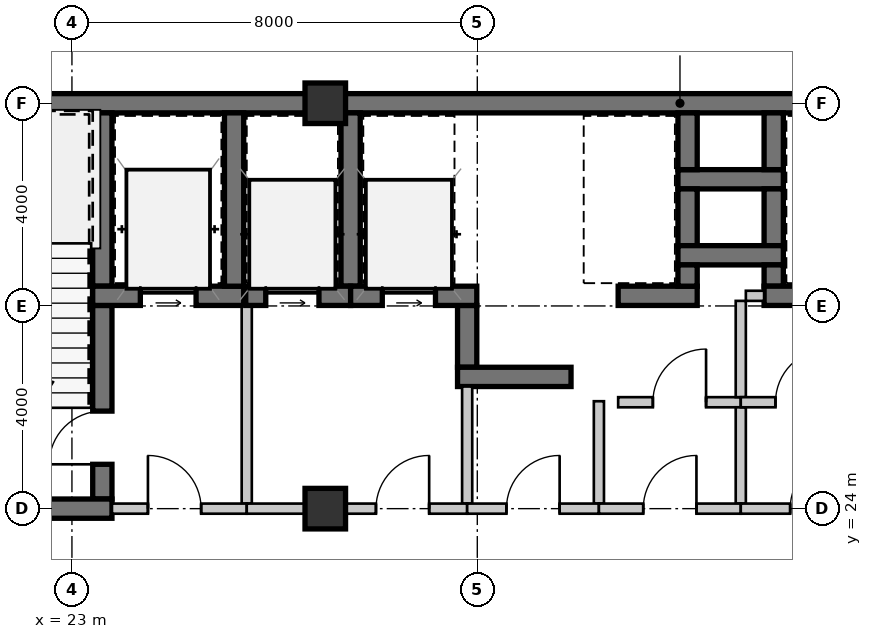
"""IFC4 building model, lengths in metres.
Left out: names, types, materials, properties, quantities, classifications, styles, units other than length and angle.
Written with IfcOpenShell. Run it as: python <this file> out.ifc"""

import sys

from ifc_helpers import new_model, si_unit, direction, frame, frame_2d, origin, origin_2d, place, context, subcontext, project, spatial, rectangle, extrude, source, transform, mapped, element, fill, save


model = new_model("IFC4")
c1 = context("Model", 3, precision=1e-05, world=origin(), true_north=direction((0.0, 1.0)))
c2 = subcontext(c1, "Body", "Model", "MODEL_VIEW")
j1 = project(units=[si_unit("LENGTHUNIT", "METRE"), si_unit("PLANEANGLEUNIT", "RADIAN")], contexts=[c1])
p1 = place(None, origin())
s1 = spatial("IfcSite", under=j1, at=p1, CompositionType="ELEMENT")
p2 = place(p1, origin())
s2 = spatial("IfcBuilding", under=s1, at=p2, CompositionType="ELEMENT")
p3 = place(p2, frame((0.0, 0.0, 26.25)))
s3 = spatial("IfcBuildingStorey", under=s2, at=p3, CompositionType="ELEMENT", Elevation=26.25)
m1 = source(origin(), c2, "Body", "SweptSolid", [
    extrude(rectangle(XDim=0.8, YDim=0.8, at=origin_2d()), origin(), (0.0, 0.0, 1.0), 3.15),
])
for number, where, z_axis, x_axis in (
    (1, (28.0, 24.0, 0.0), (0.0, 0.0, 1.0), (1.0, 0.0, 0.0)),
    (2, (28.0, 32.0, 0.0), (0.0, 0.0, 1.0), (1.0, 0.0, 0.0)),
):
    element("IfcColumn", number, at=place(p3, frame(where, z_axis=z_axis, x_axis=x_axis)), inside=s3, PredefinedType="COLUMN", context=c2, shape_type="MappedRepresentation", body=[
        mapped(m1, transform((0.0, 0.0, 0.0), scale=1.0)),
    ])
m2 = source(origin(), c2, "Body", "SweptSolid", [
    extrude(rectangle(XDim=9.19, YDim=0.38, at=frame_2d((4.595, 0.0))), origin(), (0.0, 0.0, 1.0), 2.93),
])
p4 = place(p3, frame((18.81, 32.0, 0.0), z_axis=(0.0, 0.0, 1.0), x_axis=(1.0, 0.0, 0.0)))
e3 = element("IfcWall", 3, at=p4, inside=s3, PredefinedType="SHEAR", context=c2, shape_type="MappedRepresentation", body=[
    mapped(m2, transform((0.0, 0.0, 0.0), scale=1.0)),
])
m3 = source(origin(), c2, "Body", "SweptSolid", [
    extrude(rectangle(XDim=11.2, YDim=0.38, at=frame_2d((5.6, 0.0))), origin(), (0.0, 0.0, 1.0), 2.93),
])
p5 = place(p3, frame((28.0, 32.0, 0.0), z_axis=(0.0, 0.0, 1.0), x_axis=(1.0, 0.0, 0.0)))
e4 = element("IfcWall", 4, at=p5, inside=s3, PredefinedType="SHEAR", context=c2, shape_type="MappedRepresentation", body=[
    mapped(m3, transform((0.0, 0.0, 0.0), scale=1.0)),
])
m4 = source(origin(), c2, "Body", "SweptSolid", [
    extrude(rectangle(XDim=3.42, YDim=0.38, at=frame_2d((1.71, 0.0))), origin(), (0.0, 0.0, 1.0), 2.93),
])
p6 = place(p3, frame((23.6, 28.39, 0.0), z_axis=(0.0, 0.0, 1.0), x_axis=(0.0, 1.0, 0.0)))
e5 = element("IfcWall", 5, at=p6, inside=s3, PredefinedType="SHEAR", context=c2, shape_type="MappedRepresentation", body=[
    mapped(m4, transform((0.0, 0.0, 0.0), scale=1.0)),
])
m5 = source(origin(), c2, "Body", "SweptSolid", [
    extrude(rectangle(XDim=3.82, YDim=0.38, at=frame_2d((1.91, 0.0))), origin(), (0.0, 0.0, 1.0), 2.93),
])
p7 = place(p3, frame((23.6, 24.19, 0.0), z_axis=(0.0, 0.0, 1.0), x_axis=(0.0, 1.0, 0.0)))
e6 = element("IfcWall", 6, at=p7, inside=s3, PredefinedType="SHEAR", context=c2, shape_type="MappedRepresentation", body=[
    mapped(m5, transform((0.0, 0.0, 0.0), scale=1.0)),
])
m6 = source(origin(), c2, "Body", "SweptSolid", [
    extrude(rectangle(XDim=1.05, YDim=2.1, at=frame_2d((0.525, 1.05))), frame((0.0, 0.2, 0.0), z_axis=(0.0, -1.0, 0.0), x_axis=(1.0, 0.0, 0.0)), (0.0, 0.0, 1.0), 0.4),
])
p8 = place(p7, frame((0.685, 0.0, 0.0)))
e7 = element("IfcOpeningElement", 7, at=p8, cuts=e6, PredefinedType="OPENING", context=c2, shape_type="MappedRepresentation", body=[
    mapped(m6, transform((0.0, 0.0, 0.0), scale=1.0)),
])
m7 = source(origin(), c2, "Body", "SweptSolid", [
    extrude(rectangle(XDim=4.98, YDim=0.38, at=frame_2d((2.49, 0.0))), origin(), (0.0, 0.0, 1.0), 2.93),
])
p9 = place(p3, frame((18.81, 24.0, 0.0), z_axis=(0.0, 0.0, 1.0), x_axis=(1.0, 0.0, 0.0)))
e8 = element("IfcWall", 8, at=p9, inside=s3, PredefinedType="SHEAR", context=c2, shape_type="MappedRepresentation", body=[
    mapped(m7, transform((0.0, 0.0, 0.0), scale=1.0)),
])
m8 = source(origin(), c2, "Body", "SweptSolid", [
    extrude(rectangle(XDim=2.98, YDim=0.38, at=frame_2d((1.49, 0.0))), origin(), (0.0, 0.0, 1.0), 2.93),
])
p10 = place(p3, frame((23.41, 28.2, 0.0), z_axis=(0.0, 0.0, 1.0), x_axis=(1.0, 0.0, 0.0)))
e9 = element("IfcWall", 9, at=p10, inside=s3, PredefinedType="SHEAR", context=c2, shape_type="MappedRepresentation", body=[
    mapped(m8, transform((0.0, 0.0, 0.0), scale=1.0)),
])
m9 = source(origin(), c2, "Body", "SweptSolid", [
    extrude(rectangle(XDim=1.1, YDim=2.15, at=frame_2d((0.55, 1.075))), frame((0.0, 0.2, 0.0), z_axis=(0.0, -1.0, 0.0), x_axis=(1.0, 0.0, 0.0)), (0.0, 0.0, 1.0), 0.4),
])
p11 = place(p10, frame((0.94, 0.0, 0.0)))
e10 = element("IfcOpeningElement", 10, at=p11, cuts=e9, PredefinedType="OPENING", context=c2, shape_type="MappedRepresentation", body=[
    mapped(m9, transform((0.0, 0.0, 0.0), scale=1.0)),
])
p12 = place(p3, frame((26.2, 28.39, 0.0), z_axis=(0.0, 0.0, 1.0), x_axis=(0.0, 1.0, 0.0)))
e11 = element("IfcWall", 11, at=p12, inside=s3, PredefinedType="SHEAR", context=c2, shape_type="MappedRepresentation", body=[
    mapped(m4, transform((0.0, 0.0, 0.0), scale=1.0)),
])
m10 = source(origin(), c2, "Body", "SweptSolid", [
    extrude(rectangle(XDim=3.91, YDim=0.2, at=frame_2d((1.955, 0.0))), origin(), (0.0, 0.0, 1.0), 2.93),
])
p13 = place(p3, frame((26.45, 24.1, 0.0), z_axis=(0.0, 0.0, 1.0), x_axis=(0.0, 1.0, 0.0)))
e12 = element("IfcWall", 12, at=p13, inside=s3, PredefinedType="SOLIDWALL", context=c2, shape_type="MappedRepresentation", body=[
    mapped(m10, transform((0.0, 0.0, 0.0), scale=1.0)),
])
m11 = source(origin(), c2, "Body", "SweptSolid", [
    extrude(rectangle(XDim=2.66, YDim=0.2, at=frame_2d((1.33, 0.0))), origin(), (0.0, 0.0, 1.0), 2.47),
])
p14 = place(p3, frame((23.79, 24.0, 0.0), z_axis=(0.0, 0.0, 1.0), x_axis=(1.0, 0.0, 0.0)))
e13 = element("IfcWall", 13, at=p14, inside=s3, PredefinedType="SOLIDWALL", context=c2, shape_type="MappedRepresentation", body=[
    mapped(m11, transform((0.0, 0.0, 0.0), scale=1.0)),
])
m12 = source(origin(), c2, "Body", "SweptSolid", [
    extrude(rectangle(XDim=1.05, YDim=2.1, at=frame_2d((0.525, 1.05))), frame((0.0, 0.11, 0.0), z_axis=(0.0, -1.0, 0.0), x_axis=(1.0, 0.0, 0.0)), (0.0, 0.0, 1.0), 0.22),
])
p15 = place(p14, frame((0.71, 0.0, 0.0)))
e14 = element("IfcOpeningElement", 14, at=p15, cuts=e13, PredefinedType="OPENING", context=c2, shape_type="MappedRepresentation", body=[
    mapped(m12, transform((0.0, 0.0, 0.0), scale=1.0)),
])
m13 = source(origin(), c2, "Body", "SweptSolid", [
    extrude(rectangle(XDim=2.08, YDim=0.38, at=frame_2d((1.04, 0.0))), origin(), (0.0, 0.0, 1.0), 2.93),
])
p16 = place(p3, frame((34.96, 30.5, 0.0), z_axis=(0.0, 0.0, 1.0), x_axis=(1.0, 0.0, 0.0)))
e15 = element("IfcWall", 15, at=p16, inside=s3, PredefinedType="SHEAR", context=c2, shape_type="MappedRepresentation", body=[
    mapped(m13, transform((0.0, 0.0, 0.0), scale=1.0)),
])
m14 = source(origin(), c2, "Body", "SweptSolid", [
    extrude(rectangle(XDim=1.12, YDim=0.38, at=frame_2d((0.56, 0.0))), origin(), (0.0, 0.0, 1.0), 2.93),
])
for number, where, z_axis, x_axis in (
    (16, (35.15, 31.81, 0.0), (0.0, 0.0, 1.0), (0.0, -1.0, 0.0)),
    (17, (36.85, 30.69, 0.0), (0.0, 0.0, 1.0), (0.0, 1.0, 0.0)),
    (18, (35.15, 30.31, 0.0), (0.0, 0.0, 1.0), (0.0, -1.0, 0.0)),
    (19, (36.85, 29.19, 0.0), (0.0, 0.0, 1.0), (0.0, 1.0, 0.0)),
):
    element("IfcWall", number, at=place(p3, frame(where, z_axis=z_axis, x_axis=x_axis)), inside=s3, PredefinedType="SHEAR", context=c2, shape_type="MappedRepresentation", body=[
        mapped(m14, transform((0.0, 0.0, 0.0), scale=1.0)),
    ])
p17 = place(p3, frame((34.96, 29.0, 0.0), z_axis=(0.0, 0.0, 1.0), x_axis=(1.0, 0.0, 0.0)))
e20 = element("IfcWall", 20, at=p17, inside=s3, PredefinedType="SHEAR", context=c2, shape_type="MappedRepresentation", body=[
    mapped(m13, transform((0.0, 0.0, 0.0), scale=1.0)),
])
m15 = source(origin(), c2, "Body", "SweptSolid", [
    extrude(rectangle(XDim=1.22, YDim=0.38, at=frame_2d((0.61, 0.0))), origin(), (0.0, 0.0, 1.0), 2.93),
])
p18 = place(p3, frame((30.8, 28.01, 0.0), z_axis=(0.0, 0.0, 1.0), x_axis=(0.0, -1.0, 0.0)))
e21 = element("IfcWall", 21, at=p18, inside=s3, PredefinedType="SHEAR", context=c2, shape_type="MappedRepresentation", body=[
    mapped(m15, transform((0.0, 0.0, 0.0), scale=1.0)),
])
m16 = source(origin(), c2, "Body", "SweptSolid", [
    extrude(rectangle(XDim=2.24, YDim=0.38, at=frame_2d((1.12, 0.0))), origin(), (0.0, 0.0, 1.0), 2.93),
])
p19 = place(p3, frame((30.61, 26.6, 0.0), z_axis=(0.0, 0.0, 1.0), x_axis=(1.0, 0.0, 0.0)))
e22 = element("IfcWall", 22, at=p19, inside=s3, PredefinedType="SHEAR", context=c2, shape_type="MappedRepresentation", body=[
    mapped(m16, transform((0.0, 0.0, 0.0), scale=1.0)),
])
p20 = place(p3, frame((28.5, 28.39, 0.0), z_axis=(0.0, 0.0, 1.0), x_axis=(0.0, 1.0, 0.0)))
e23 = element("IfcWall", 23, at=p20, inside=s3, PredefinedType="SHEAR", context=c2, shape_type="MappedRepresentation", body=[
    mapped(m4, transform((0.0, 0.0, 0.0), scale=1.0)),
])
m17 = source(origin(), c2, "Body", "SweptSolid", [
    extrude(rectangle(XDim=2.07, YDim=0.38, at=frame_2d((1.035, 0.0))), origin(), (0.0, 0.0, 1.0), 2.93),
])
p21 = place(p3, frame((26.43, 28.2, 0.0), z_axis=(0.0, 0.0, 1.0), x_axis=(1.0, 0.0, 0.0)))
e24 = element("IfcWall", 24, at=p21, inside=s3, PredefinedType="SHEAR", context=c2, shape_type="MappedRepresentation", body=[
    mapped(m17, transform((0.0, 0.0, 0.0), scale=1.0)),
])
m18 = source(origin(), c2, "Body", "SweptSolid", [
    extrude(rectangle(XDim=1.05, YDim=2.15, at=frame_2d((0.525, 1.075))), frame((0.0, 0.2, 0.0), z_axis=(0.0, -1.0, 0.0), x_axis=(1.0, 0.0, 0.0)), (0.0, 0.0, 1.0), 0.4),
])
p22 = place(p21, frame((0.395, 0.0, 0.0)))
e25 = element("IfcOpeningElement", 25, at=p22, cuts=e24, PredefinedType="OPENING", context=c2, shape_type="MappedRepresentation", body=[
    mapped(m18, transform((0.0, 0.0, 0.0), scale=1.0)),
])
m19 = source(origin(), c2, "Body", "SweptSolid", [
    extrude(rectangle(XDim=2.49, YDim=0.38, at=frame_2d((1.245, 0.0))), origin(), (0.0, 0.0, 1.0), 2.93),
])
p23 = place(p3, frame((28.5, 28.2, 0.0), z_axis=(0.0, 0.0, 1.0), x_axis=(1.0, 0.0, 0.0)))
e26 = element("IfcWall", 26, at=p23, inside=s3, PredefinedType="SHEAR", context=c2, shape_type="MappedRepresentation", body=[
    mapped(m19, transform((0.0, 0.0, 0.0), scale=1.0)),
])
p24 = place(p23, frame((0.625, 0.0, 0.0)))
e27 = element("IfcOpeningElement", 27, at=p24, cuts=e26, PredefinedType="OPENING", context=c2, shape_type="MappedRepresentation", body=[
    mapped(m18, transform((0.0, 0.0, 0.0), scale=1.0)),
])
m20 = source(origin(), c2, "Body", "SweptSolid", [
    extrude(rectangle(XDim=2.31, YDim=0.2, at=frame_2d((1.155, 0.0))), origin(), (0.0, 0.0, 1.0), 2.93),
])
p25 = place(p3, frame((30.8, 26.41, 0.0), z_axis=(0.0, 0.0, 1.0), x_axis=(0.0, -1.0, 0.0)))
e28 = element("IfcWall", 28, at=p25, inside=s3, PredefinedType="SOLIDWALL", context=c2, shape_type="MappedRepresentation", body=[
    mapped(m20, transform((0.0, 0.0, 0.0), scale=1.0)),
])
m21 = source(origin(), c2, "Body", "SweptSolid", [
    extrude(rectangle(XDim=4.35, YDim=0.2, at=frame_2d((2.175, 0.0))), origin(), (0.0, 0.0, 1.0), 2.47),
])
p26 = place(p3, frame((30.8, 24.0, 0.0), z_axis=(0.0, 0.0, 1.0), x_axis=(-1.0, 0.0, 0.0)))
e29 = element("IfcWall", 29, at=p26, inside=s3, PredefinedType="SOLIDWALL", context=c2, shape_type="MappedRepresentation", body=[
    mapped(m21, transform((0.0, 0.0, 0.0), scale=1.0)),
])
p27 = place(p26, frame((0.75, 0.0, 0.0)))
e30 = element("IfcOpeningElement", 30, at=p27, cuts=e29, PredefinedType="OPENING", context=c2, shape_type="MappedRepresentation", body=[
    mapped(m12, transform((0.0, 0.0, 0.0), scale=1.0)),
])
m22 = source(origin(), c2, "Body", "SweptSolid", [
    extrude(rectangle(XDim=1.56, YDim=0.38, at=frame_2d((0.78, 0.0))), origin(), (0.0, 0.0, 1.0), 2.93),
])
p28 = place(p3, frame((33.78, 28.2, 0.0), z_axis=(0.0, 0.0, 1.0), x_axis=(1.0, 0.0, 0.0)))
e31 = element("IfcWall", 31, at=p28, inside=s3, PredefinedType="SHEAR", context=c2, shape_type="MappedRepresentation", body=[
    mapped(m22, transform((0.0, 0.0, 0.0), scale=1.0)),
])
m23 = source(origin(), c2, "Body", "SweptSolid", [
    extrude(rectangle(XDim=0.42, YDim=0.38, at=frame_2d((0.21, 0.0))), origin(), (0.0, 0.0, 1.0), 2.93),
])
for number, where, z_axis, x_axis in (
    (32, (35.15, 28.39, 0.0), (0.0, 0.0, 1.0), (0.0, 1.0, 0.0)),
    (33, (36.85, 28.81, 0.0), (0.0, 0.0, 1.0), (0.0, -1.0, 0.0)),
):
    element("IfcWall", number, at=place(p3, frame(where, z_axis=z_axis, x_axis=x_axis)), inside=s3, PredefinedType="SHEAR", context=c2, shape_type="MappedRepresentation", body=[
        mapped(m23, transform((0.0, 0.0, 0.0), scale=1.0)),
    ])
m24 = source(origin(), c2, "Body", "SweptSolid", [
    extrude(rectangle(XDim=1.96, YDim=0.38, at=frame_2d((0.98, 0.0))), origin(), (0.0, 0.0, 1.0), 2.93),
])
p29 = place(p3, frame((36.66, 28.2, 0.0), z_axis=(0.0, 0.0, 1.0), x_axis=(1.0, 0.0, 0.0)))
e34 = element("IfcWall", 34, at=p29, inside=s3, PredefinedType="SHEAR", context=c2, shape_type="MappedRepresentation", body=[
    mapped(m24, transform((0.0, 0.0, 0.0), scale=1.0)),
])
m25 = source(origin(), c2, "Body", "SweptSolid", [
    extrude(rectangle(XDim=2.02, YDim=0.2, at=frame_2d((1.01, 0.0))), origin(), (0.0, 0.0, 1.0), 2.93),
])
p30 = place(p3, frame((33.4, 26.12, 0.0), z_axis=(0.0, 0.0, 1.0), x_axis=(0.0, -1.0, 0.0)))
e35 = element("IfcWall", 35, at=p30, inside=s3, PredefinedType="SOLIDWALL", context=c2, shape_type="MappedRepresentation", body=[
    mapped(m25, transform((0.0, 0.0, 0.0), scale=1.0)),
])
m26 = source(origin(), c2, "Body", "SweptSolid", [
    extrude(rectangle(XDim=2.6, YDim=0.2, at=frame_2d((1.3, 0.0))), origin(), (0.0, 0.0, 1.0), 2.47),
])
p31 = place(p3, frame((33.4, 24.0, 0.0), z_axis=(0.0, 0.0, 1.0), x_axis=(-1.0, 0.0, 0.0)))
e36 = element("IfcWall", 36, at=p31, inside=s3, PredefinedType="SOLIDWALL", context=c2, shape_type="MappedRepresentation", body=[
    mapped(m26, transform((0.0, 0.0, 0.0), scale=1.0)),
])
p32 = place(p31, frame((0.775, 0.0, 0.0)))
e37 = element("IfcOpeningElement", 37, at=p32, cuts=e36, PredefinedType="OPENING", context=c2, shape_type="MappedRepresentation", body=[
    mapped(m12, transform((0.0, 0.0, 0.0), scale=1.0)),
])
m27 = source(origin(), c2, "Body", "SweptSolid", [
    extrude(rectangle(XDim=2.42, YDim=0.2, at=frame_2d((1.21, 0.0))), origin(), (0.0, 0.0, 1.0), 2.93),
])
p33 = place(p3, frame((33.78, 26.1, 0.0), z_axis=(0.0, 0.0, 1.0), x_axis=(1.0, 0.0, 0.0)))
e38 = element("IfcWall", 38, at=p33, inside=s3, PredefinedType="SOLIDWALL", context=c2, shape_type="MappedRepresentation", body=[
    mapped(m27, transform((0.0, 0.0, 0.0), scale=1.0)),
])
p34 = place(p33, frame((0.685, 0.0, 0.0)))
e39 = element("IfcOpeningElement", 39, at=p34, cuts=e38, PredefinedType="OPENING", context=c2, shape_type="MappedRepresentation", body=[
    mapped(m12, transform((0.0, 0.0, 0.0), scale=1.0)),
])
m28 = source(origin(), c2, "Body", "SweptSolid", [
    extrude(rectangle(XDim=1.9, YDim=0.2, at=frame_2d((0.95, 0.0))), origin(), (0.0, 0.0, 1.0), 2.93),
])
p35 = place(p3, frame((36.2, 26.0, 0.0), z_axis=(0.0, 0.0, 1.0), x_axis=(0.0, -1.0, 0.0)))
e40 = element("IfcWall", 40, at=p35, inside=s3, PredefinedType="SOLIDWALL", context=c2, shape_type="MappedRepresentation", body=[
    mapped(m28, transform((0.0, 0.0, 0.0), scale=1.0)),
])
m29 = source(origin(), c2, "Body", "SweptSolid", [
    extrude(rectangle(XDim=2.8, YDim=0.2, at=frame_2d((1.4, 0.0))), origin(), (0.0, 0.0, 1.0), 2.47),
])
p36 = place(p3, frame((36.2, 24.0, 0.0), z_axis=(0.0, 0.0, 1.0), x_axis=(-1.0, 0.0, 0.0)))
e41 = element("IfcWall", 41, at=p36, inside=s3, PredefinedType="SOLIDWALL", context=c2, shape_type="MappedRepresentation", body=[
    mapped(m29, transform((0.0, 0.0, 0.0), scale=1.0)),
])
p37 = place(p36, frame((0.875, 0.0, 0.0)))
e42 = element("IfcOpeningElement", 42, at=p37, cuts=e41, PredefinedType="OPENING", context=c2, shape_type="MappedRepresentation", body=[
    mapped(m12, transform((0.0, 0.0, 0.0), scale=1.0)),
])
m30 = source(origin(), c2, "Body", "SweptSolid", [
    extrude(rectangle(XDim=1.9, YDim=0.2, at=frame_2d((0.95, 0.0))), origin(), (0.0, 0.0, 1.0), 2.93),
])
p38 = place(p3, frame((36.2, 28.1, 0.0), z_axis=(0.0, 0.0, 1.0), x_axis=(0.0, -1.0, 0.0)))
e43 = element("IfcWall", 43, at=p38, inside=s3, PredefinedType="SOLIDWALL", context=c2, shape_type="MappedRepresentation", body=[
    mapped(m30, transform((0.0, 0.0, 0.0), scale=1.0)),
])
m31 = source(origin(), c2, "Body", "SweptSolid", [
    extrude(rectangle(XDim=0.36, YDim=0.2, at=frame_2d((0.18, 0.0))), origin(), (0.0, 0.0, 1.0), 2.93),
])
p39 = place(p3, frame((36.66, 28.2, 0.0), z_axis=(0.0, 0.0, 1.0), x_axis=(-1.0, 0.0, 0.0)))
e44 = element("IfcWall", 44, at=p39, inside=s3, PredefinedType="SOLIDWALL", context=c2, shape_type="MappedRepresentation", body=[
    mapped(m31, transform((0.0, 0.0, 0.0), scale=1.0)),
])
m32 = source(origin(), c2, "Body", "SweptSolid", [
    extrude(rectangle(XDim=2.42, YDim=0.2, at=frame_2d((1.21, 0.0))), origin(), (0.0, 0.0, 1.0), 2.93),
])
p40 = place(p3, frame((36.2, 26.1, 0.0), z_axis=(0.0, 0.0, 1.0), x_axis=(1.0, 0.0, 0.0)))
e45 = element("IfcWall", 45, at=p40, inside=s3, PredefinedType="SOLIDWALL", context=c2, shape_type="MappedRepresentation", body=[
    mapped(m32, transform((0.0, 0.0, 0.0), scale=1.0)),
])
p41 = place(p40, frame((0.685, 0.0, 0.0)))
e46 = element("IfcOpeningElement", 46, at=p41, cuts=e45, PredefinedType="OPENING", context=c2, shape_type="MappedRepresentation", body=[
    mapped(m12, transform((0.0, 0.0, 0.0), scale=1.0)),
])
m33 = source(origin(), c2, "Body", "SweptSolid", [
    extrude(rectangle(XDim=3.0, YDim=0.2, at=frame_2d((1.5, 0.0))), origin(), (0.0, 0.0, 1.0), 2.47),
])
p42 = place(p3, frame((39.2, 24.0, 0.0), z_axis=(0.0, 0.0, 1.0), x_axis=(-1.0, 0.0, 0.0)))
e47 = element("IfcWall", 47, at=p42, inside=s3, PredefinedType="SOLIDWALL", context=c2, shape_type="MappedRepresentation", body=[
    mapped(m33, transform((0.0, 0.0, 0.0), scale=1.0)),
])
p43 = place(p42, frame((0.975, 0.0, 0.0)))
e48 = element("IfcOpeningElement", 48, at=p43, cuts=e47, PredefinedType="OPENING", context=c2, shape_type="MappedRepresentation", body=[
    mapped(m12, transform((0.0, 0.0, 0.0), scale=1.0)),
])
m34 = source(origin(), c2, "Body", "SweptSolid", [
    extrude(rectangle(XDim=1.05, YDim=2.1, at=frame_2d((0.525, 1.05))), frame((0.0, 0.025, 0.0), z_axis=(0.0, -1.0, 0.0), x_axis=(1.0, 0.0, 0.0)), (0.0, 0.0, 1.0), 0.05),
])
p44 = place(p8, origin())
e49 = element("IfcDoor", 49, at=p44, inside=s3, OperationType="SINGLE_SWING_LEFT", PredefinedType="DOOR", context=c2, shape_type="MappedRepresentation", body=[
    mapped(m34, transform((0.0, 0.0, 0.0), scale=1.0)),
])
fill(e7, e49)
m35 = source(origin(), c2, "Body", "SweptSolid", [
    extrude(rectangle(XDim=1.1, YDim=2.15, at=frame_2d((0.55, 1.075))), frame((0.0, 0.025, 0.0), z_axis=(0.0, -1.0, 0.0), x_axis=(1.0, 0.0, 0.0)), (0.0, 0.0, 1.0), 0.05),
])
p45 = place(p11, origin())
e50 = element("IfcDoor", 50, at=p45, inside=s3, OperationType="SLIDING_TO_LEFT", PredefinedType="DOOR", context=c2, shape_type="MappedRepresentation", body=[
    mapped(m35, transform((0.0, 0.0, 0.0), scale=1.0)),
])
fill(e10, e50)
p46 = place(p15, origin())
e51 = element("IfcDoor", 51, at=p46, inside=s3, OperationType="SINGLE_SWING_LEFT", PredefinedType="DOOR", context=c2, shape_type="MappedRepresentation", body=[
    mapped(m34, transform((0.0, 0.0, 0.0), scale=1.0)),
])
fill(e14, e51)
m36 = source(origin(), c2, "Body", "SweptSolid", [
    extrude(rectangle(XDim=1.05, YDim=2.15, at=frame_2d((0.525, 1.075))), frame((0.0, 0.025, 0.0), z_axis=(0.0, -1.0, 0.0), x_axis=(1.0, 0.0, 0.0)), (0.0, 0.0, 1.0), 0.05),
])
p47 = place(p22, origin())
e52 = element("IfcDoor", 52, at=p47, inside=s3, OperationType="SLIDING_TO_LEFT", PredefinedType="DOOR", context=c2, shape_type="MappedRepresentation", body=[
    mapped(m36, transform((0.0, 0.0, 0.0), scale=1.0)),
])
fill(e25, e52)
p48 = place(p24, origin())
e53 = element("IfcDoor", 53, at=p48, inside=s3, OperationType="SLIDING_TO_LEFT", PredefinedType="DOOR", context=c2, shape_type="MappedRepresentation", body=[
    mapped(m36, transform((0.0, 0.0, 0.0), scale=1.0)),
])
fill(e27, e53)
p49 = place(p27, frame((1.05, 0.0, 0.0), z_axis=(0.0, 0.0, 1.0), x_axis=(-1.0, 0.0, 0.0)))
e54 = element("IfcDoor", 54, at=p49, inside=s3, OperationType="SINGLE_SWING_RIGHT", PredefinedType="DOOR", context=c2, shape_type="MappedRepresentation", body=[
    mapped(m34, transform((0.0, 0.0, 0.0), scale=1.0)),
])
fill(e30, e54)
p50 = place(p32, frame((1.05, 0.0, 0.0), z_axis=(0.0, 0.0, 1.0), x_axis=(-1.0, 0.0, 0.0)))
e55 = element("IfcDoor", 55, at=p50, inside=s3, OperationType="SINGLE_SWING_RIGHT", PredefinedType="DOOR", context=c2, shape_type="MappedRepresentation", body=[
    mapped(m34, transform((0.0, 0.0, 0.0), scale=1.0)),
])
fill(e37, e55)
p51 = place(p34, origin())
e56 = element("IfcDoor", 56, at=p51, inside=s3, OperationType="SINGLE_SWING_RIGHT", PredefinedType="DOOR", context=c2, shape_type="MappedRepresentation", body=[
    mapped(m34, transform((0.0, 0.0, 0.0), scale=1.0)),
])
fill(e39, e56)
p52 = place(p37, frame((1.05, 0.0, 0.0), z_axis=(0.0, 0.0, 1.0), x_axis=(-1.0, 0.0, 0.0)))
e57 = element("IfcDoor", 57, at=p52, inside=s3, OperationType="SINGLE_SWING_RIGHT", PredefinedType="DOOR", context=c2, shape_type="MappedRepresentation", body=[
    mapped(m34, transform((0.0, 0.0, 0.0), scale=1.0)),
])
fill(e42, e57)
p53 = place(p41, origin())
e58 = element("IfcDoor", 58, at=p53, inside=s3, OperationType="SINGLE_SWING_RIGHT", PredefinedType="DOOR", context=c2, shape_type="MappedRepresentation", body=[
    mapped(m34, transform((0.0, 0.0, 0.0), scale=1.0)),
])
fill(e46, e58)
p54 = place(p43, frame((1.05, 0.0, 0.0), z_axis=(0.0, 0.0, 1.0), x_axis=(-1.0, 0.0, 0.0)))
e59 = element("IfcDoor", 59, at=p54, inside=s3, OperationType="SINGLE_SWING_RIGHT", PredefinedType="DOOR", context=c2, shape_type="MappedRepresentation", body=[
    mapped(m34, transform((0.0, 0.0, 0.0), scale=1.0)),
])
fill(e48, e59)
save(model, sys.argv[1])
